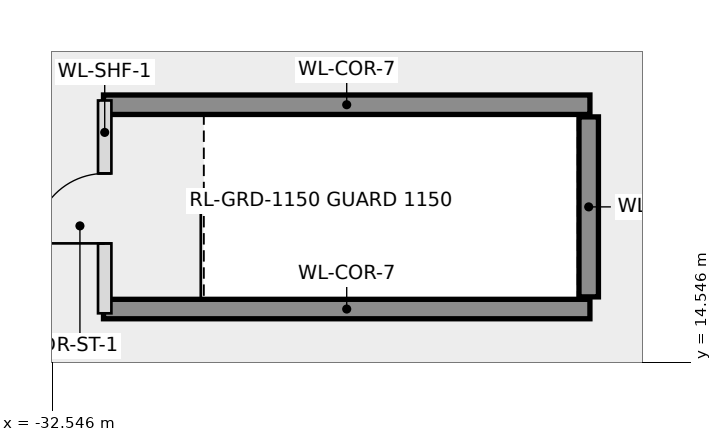
"""IFC4 building model, lengths in metres.
Left out: names, types, materials, properties, quantities, classifications, styles, units other than length and angle.
Written with IfcOpenShell. Run it as: python <this file> out.ifc"""

import sys

from ifc_helpers import new_model, si_unit, direction, frame, frame_2d, origin, place, context, subcontext, project, spatial, rectangle, extrude, element, fill, save


model = new_model("IFC4")
c1 = context("Model", 3, precision=1e-05, world=origin(), true_north=direction((0.0, 1.0)))
c2 = subcontext(c1, "Body", "Model", "MODEL_VIEW")
j1 = project(units=[si_unit("LENGTHUNIT", "METRE"), si_unit("PLANEANGLEUNIT", "RADIAN")], contexts=[c1])
p1 = place(None, origin())
s1 = spatial("IfcSite", under=j1, at=p1, CompositionType="ELEMENT")
p2 = place(p1, origin())
s2 = spatial("IfcBuilding", under=s1, at=p2, CompositionType="ELEMENT")
p3 = place(p2, frame((0.0, 0.0, 20.1)))
s3 = spatial("IfcBuildingStorey", under=s2, at=p3, CompositionType="ELEMENT", Elevation=20.1)
for number, where, z_axis, x_axis in (
    (1, (-31.7, 18.78, 0.0), (0.0, 0.0, 1.0), (1.0, 0.0, 0.0)),
    (2, (-31.7, 15.42, 0.0), (0.0, 0.0, 1.0), (1.0, 0.0, 0.0)),
):
    element("IfcWall", number, at=place(p3, frame(where, z_axis=z_axis, x_axis=x_axis)), inside=s3, PredefinedType="SHEAR", context=c2, shape_type="SweptSolid", body=[
        extrude(rectangle(XDim=8.0, YDim=0.32, at=frame_2d((4.0, 0.0))), origin(), (0.0, 0.0, 1.0), 3.52),
    ])
p4 = place(p3, frame((-23.72, 15.62, 0.0), z_axis=(0.0, 0.0, 1.0), x_axis=(0.0, 1.0, 0.0)))
e3 = element("IfcWall", 3, at=p4, inside=s3, PredefinedType="SHEAR", context=c2, shape_type="SweptSolid", body=[
    extrude(rectangle(XDim=2.96, YDim=0.32, at=frame_2d((1.48, 0.0))), origin(), (0.0, 0.0, 1.0), 3.52),
])
p5 = place(p3, frame((-31.68, 15.35, 0.0), z_axis=(0.0, 0.0, 1.0), x_axis=(0.0, 1.0, 0.0)))
e4 = element("IfcWall", 4, at=p5, inside=s3, PredefinedType="PLUMBINGWALL", context=c2, shape_type="SweptSolid", body=[
    extrude(rectangle(XDim=3.5, YDim=0.22, at=frame_2d((1.75, 0.0))), origin(), (0.0, 0.0, 1.0), 3.495),
])
p6 = place(p5, frame((1.15, 0.0, 0.0)))
e5 = element("IfcOpeningElement", 5, at=p6, cuts=e4, PredefinedType="OPENING", context=c2, shape_type="SweptSolid", body=[
    extrude(rectangle(XDim=1.15, YDim=2.15, at=frame_2d((0.575, 1.075))), frame((0.0, 0.12, 0.0), z_axis=(0.0, -1.0, 0.0), x_axis=(1.0, 0.0, 0.0)), (0.0, 0.0, 1.0), 0.24),
])
p7 = place(p6, origin())
e6 = element("IfcDoor", 6, at=p7, inside=s3, OperationType="SINGLE_SWING_LEFT", PredefinedType="DOOR", context=c2, shape_type="SweptSolid", body=[
    extrude(rectangle(XDim=1.15, YDim=2.15, at=frame_2d((0.575, 1.075))), frame((0.0, 0.025, 0.0), z_axis=(0.0, -1.0, 0.0), x_axis=(1.0, 0.0, 0.0)), (0.0, 0.0, 1.0), 0.05),
])
fill(e5, e6)
save(model, sys.argv[1])
